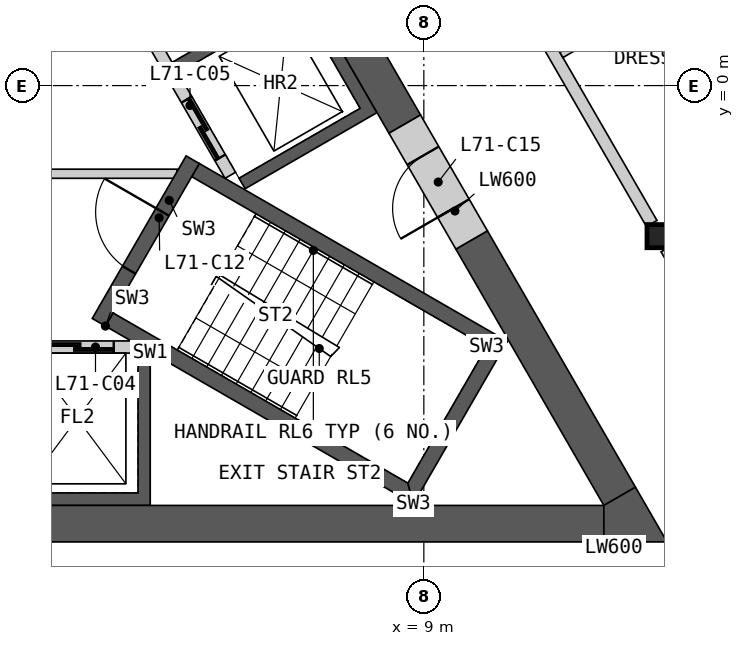
"""IFC4 building model, lengths in metres.
Left out: names, types, materials, properties, quantities, classifications, styles, units other than length and angle.
Written with IfcOpenShell. Run it as: python <this file> out.ifc"""

import sys

from ifc_helpers import new_model, si_unit, direction, frame, frame_2d, origin, origin_2d, place, context, subcontext, project, spatial, polyline, rectangle, i_section, outline, extrude, element, fill, save


model = new_model("IFC4")
c1 = context("Model", 3, precision=1e-05, world=origin(), true_north=direction((0.0, 1.0)))
c2 = subcontext(c1, "Body", "Model", "MODEL_VIEW")
j1 = project(units=[si_unit("LENGTHUNIT", "METRE"), si_unit("PLANEANGLEUNIT", "RADIAN")], contexts=[c1])
p1 = place(None, origin())
s1 = spatial("IfcSite", under=j1, at=p1, CompositionType="ELEMENT")
p2 = place(p1, origin())
s2 = spatial("IfcBuilding", under=s1, at=p2, CompositionType="ELEMENT")
p3 = place(p2, frame((0.0, 0.0, 322.2)))
s3 = spatial("IfcBuildingStorey", under=s2, at=p3, CompositionType="ELEMENT", Elevation=322.2)
p4 = place(p3, frame((12.868, -2.476, 0.0), z_axis=(0.0, 0.0, 1.0), x_axis=(1.0, 0.0, 0.0)))
e1 = element("IfcColumn", 1, at=p4, inside=s3, PredefinedType="COLUMN", context=c2, shape_type="SweptSolid", body=[
    extrude(i_section(OverallWidth=0.396, OverallDepth=0.381, WebThickness=0.019, FlangeThickness=0.03, at=origin_2d()), origin(), (0.0, 0.0, 1.0), 3.4),
])
p5 = place(p3, origin())
e2 = element("IfcWall", 2, at=p5, inside=s3, PredefinedType="SHEAR", context=c2, shape_type="SweptSolid", body=[
    extrude(outline(polyline([(4.5, -4.4), (4.5, -6.906), (-4.5, -6.906), (-4.5, -4.4), (-4.3, -4.4), (-4.3, -6.7), (-2.3, -6.7), (-2.3, -4.4), (-2.1, -4.4), (-2.1, -6.7), (-0.1, -6.7), (-0.1, -4.4), (0.1, -4.4), (0.1, -6.7), (2.1, -6.7), (2.1, -4.4), (2.3, -4.4), (2.3, -6.7), (4.3, -6.7), (4.3, -4.4), (4.5, -4.4)])), origin(), (0.0, 0.0, 1.0), 3.1),
])
p6 = place(p3, frame((-4.187, -4.3, 0.0), z_axis=(0.0, 0.0, 1.0), x_axis=(1.0, 0.0, 0.0)))
e3 = element("IfcWall", 3, at=p6, inside=s3, PredefinedType="SOLIDWALL", context=c2, shape_type="SweptSolid", body=[
    extrude(rectangle(XDim=8.373, YDim=0.2, at=frame_2d((4.187, 0.0))), origin(), (0.0, 0.0, 1.0), 3.1),
])
p7 = place(p6, frame((0.287, 0.0, 0.0)))
e4 = element("IfcOpeningElement", 4, at=p7, cuts=e3, PredefinedType="OPENING", context=c2, shape_type="SweptSolid", body=[
    extrude(rectangle(XDim=1.2, YDim=2.1, at=frame_2d((0.6, 1.05))), frame((0.0, 0.11, 0.0), z_axis=(0.0, -1.0, 0.0), x_axis=(1.0, 0.0, 0.0)), (0.0, 0.0, 1.0), 0.22),
])
p8 = place(p6, frame((2.387, 0.0, 0.0)))
e5 = element("IfcOpeningElement", 5, at=p8, cuts=e3, PredefinedType="OPENING", context=c2, shape_type="SweptSolid", body=[
    extrude(rectangle(XDim=1.4, YDim=2.1, at=frame_2d((0.7, 1.05))), frame((0.0, 0.11, 0.0), z_axis=(0.0, -1.0, 0.0), x_axis=(1.0, 0.0, 0.0)), (0.0, 0.0, 1.0), 0.22),
])
p9 = place(p6, frame((4.737, 0.0, 0.0)))
e6 = element("IfcOpeningElement", 6, at=p9, cuts=e3, PredefinedType="OPENING", context=c2, shape_type="SweptSolid", body=[
    extrude(rectangle(XDim=1.1, YDim=2.1, at=frame_2d((0.55, 1.05))), frame((0.0, 0.11, 0.0), z_axis=(0.0, -1.0, 0.0), x_axis=(1.0, 0.0, 0.0)), (0.0, 0.0, 1.0), 0.22),
])
p10 = place(p6, frame((6.887, 0.0, 0.0)))
e7 = element("IfcOpeningElement", 7, at=p10, cuts=e3, PredefinedType="OPENING", context=c2, shape_type="SweptSolid", body=[
    extrude(rectangle(XDim=1.2, YDim=2.1, at=frame_2d((0.6, 1.05))), frame((0.0, 0.11, 0.0), z_axis=(0.0, -1.0, 0.0), x_axis=(1.0, 0.0, 0.0)), (0.0, 0.0, 1.0), 0.22),
])
p11 = place(p3, origin())
e8 = element("IfcWall", 8, at=p11, inside=s3, PredefinedType="SHEAR", context=c2, shape_type="SweptSolid", body=[
    extrude(outline(polyline([(1.561, 6.097), (3.731, 7.35), (8.231, -0.444), (6.061, -1.697), (5.96, -1.524), (7.952, -0.374), (6.952, 1.358), (4.96, 0.208), (4.861, 0.381), (6.852, 1.531), (5.852, 3.263), (3.861, 2.113), (3.76, 2.287), (5.752, 3.437), (4.752, 5.169), (2.76, 4.019), (2.66, 4.192), (4.652, 5.342), (3.652, 7.074), (1.66, 5.924), (1.561, 6.097)])), origin(), (0.0, 0.0, 1.0), 3.1),
])
p12 = place(p3, frame((5.817, -1.476, 0.0), z_axis=(0.0, 0.0, 1.0), x_axis=(-0.500002616675, 0.866023893041, 0.0)))
e9 = element("IfcWall", 9, at=p12, inside=s3, PredefinedType="SOLIDWALL", context=c2, shape_type="SweptSolid", body=[
    extrude(rectangle(XDim=8.373, YDim=0.2, at=frame_2d((4.187, 0.0))), origin(), (0.0, 0.0, 1.0), 3.1),
])
p13 = place(p12, frame((0.337, 0.0, 0.0)))
e10 = element("IfcOpeningElement", 10, at=p13, cuts=e9, PredefinedType="OPENING", context=c2, shape_type="SweptSolid", body=[
    extrude(rectangle(XDim=1.1, YDim=2.1, at=frame_2d((0.55, 1.05))), frame((0.0, 0.11, 0.0), z_axis=(0.0, -1.0, 0.0), x_axis=(1.0, 0.0, 0.0)), (0.0, 0.0, 1.0), 0.22),
])
p14 = place(p12, frame((2.537, 0.0, 0.0)))
e11 = element("IfcOpeningElement", 11, at=p14, cuts=e9, PredefinedType="OPENING", context=c2, shape_type="SweptSolid", body=[
    extrude(rectangle(XDim=1.1, YDim=2.1, at=frame_2d((0.55, 1.05))), frame((0.0, 0.11, 0.0), z_axis=(0.0, -1.0, 0.0), x_axis=(1.0, 0.0, 0.0)), (0.0, 0.0, 1.0), 0.22),
])
p15 = place(p12, frame((4.737, 0.0, 0.0)))
e12 = element("IfcOpeningElement", 12, at=p15, cuts=e9, PredefinedType="OPENING", context=c2, shape_type="SweptSolid", body=[
    extrude(rectangle(XDim=1.1, YDim=2.1, at=frame_2d((0.55, 1.05))), frame((0.0, 0.11, 0.0), z_axis=(0.0, -1.0, 0.0), x_axis=(1.0, 0.0, 0.0)), (0.0, 0.0, 1.0), 0.22),
])
p16 = place(p12, frame((7.037, 0.0, 0.0)))
e13 = element("IfcOpeningElement", 13, at=p16, cuts=e9, PredefinedType="OPENING", context=c2, shape_type="SweptSolid", body=[
    extrude(rectangle(XDim=0.9, YDim=2.1, at=frame_2d((0.45, 1.05))), frame((0.0, 0.11, 0.0), z_axis=(0.0, -1.0, 0.0), x_axis=(1.0, 0.0, 0.0)), (0.0, 0.0, 1.0), 0.22),
])
p17 = place(p3, frame((-4.941, -1.45, 0.0), z_axis=(0.0, 0.0, 1.0), x_axis=(1.0, 0.0, 0.0)))
e14 = element("IfcWall", 14, at=p17, inside=s3, PredefinedType="PARTITIONING", context=c2, shape_type="SweptSolid", body=[
    extrude(rectangle(XDim=9.882, YDim=0.15, at=frame_2d((4.941, 0.0))), origin(), (0.0, 0.0, 1.0), 3.1),
])
p18 = place(p17, frame((4.391, 0.0, 0.0)))
e15 = element("IfcOpeningElement", 15, at=p18, cuts=e14, PredefinedType="OPENING", context=c2, shape_type="SweptSolid", body=[
    extrude(rectangle(XDim=1.1, YDim=2.1, at=frame_2d((0.55, 1.05))), frame((0.0, 0.085, 0.0), z_axis=(0.0, -1.0, 0.0), x_axis=(1.0, 0.0, 0.0)), (0.0, 0.0, 1.0), 0.17),
])
p19 = place(p3, origin())
e16 = element("IfcWall", 16, at=p19, inside=s3, PredefinedType="SHEAR", context=c2, shape_type="SweptSolid", body=[
    extrude(outline(polyline([(3.763, -3.956), (8.83, -6.881), (8.738, -6.539), (3.888, -3.739), (3.763, -3.956)])), origin(), (0.0, 0.0, 1.0), 3.1),
])
p20 = place(p3, origin())
e17 = element("IfcWall", 17, at=p20, inside=s3, PredefinedType="SHEAR", context=c2, shape_type="SweptSolid", body=[
    extrude(outline(polyline([(8.83, -6.881), (10.374, -4.206), (10.032, -4.298), (8.738, -6.539), (8.83, -6.881)])), origin(), (0.0, 0.0, 1.0), 3.1),
])
p21 = place(p3, origin())
e18 = element("IfcWall", 18, at=p21, inside=s3, PredefinedType="SHEAR", context=c2, shape_type="SweptSolid", body=[
    extrude(outline(polyline([(10.032, -4.298), (10.374, -4.206), (5.307, -1.281), (5.182, -1.498), (10.032, -4.298)])), origin(), (0.0, 0.0, 1.0), 3.1),
])
p22 = place(p3, frame((3.655, -3.893, 0.0), z_axis=(0.0, 0.0, 1.0), x_axis=(0.499982516597, 0.866035497597, 0.0)))
e19 = element("IfcWall", 19, at=p22, inside=s3, PredefinedType="SHEAR", context=c2, shape_type="SweptSolid", body=[
    extrude(rectangle(XDim=3.088, YDim=0.25, at=frame_2d((1.544, 0.0))), origin(), (0.0, 0.0, 1.0), 3.1),
])
p23 = place(p22, frame((0.994, 0.0, 0.0)))
e20 = element("IfcOpeningElement", 20, at=p23, cuts=e19, PredefinedType="OPENING", context=c2, shape_type="SweptSolid", body=[
    extrude(rectangle(XDim=1.1, YDim=2.1, at=frame_2d((0.55, 1.05))), frame((0.0, 0.135, 0.0), z_axis=(0.0, -1.0, 0.0), x_axis=(1.0, 0.0, 0.0)), (0.0, 0.0, 1.0), 0.27),
])
for number, where, z_axis, x_axis in (
    (21, (-4.892, -7.206, 0.0), (0.0, 0.0, 1.0), (1.0, 0.0, 0.0)),
    (22, (8.686, -0.634, 0.0), (0.0, 0.0, 1.0), (-0.5, 0.866, 0.0)),
):
    element("IfcWall", number, at=place(p3, frame(where, z_axis=z_axis, x_axis=x_axis)), inside=s3, PredefinedType="SHEAR", context=c2, shape_type="SweptSolid", body=[
        extrude(rectangle(XDim=16.853, YDim=0.6, at=frame_2d((8.426, 0.0))), origin(), (0.0, 0.0, 1.0), 3.1),
    ])
p24 = place(p3, frame((12.221, -6.756, 0.0), z_axis=(0.0, 0.0, 1.0), x_axis=(-0.50000604952, 0.866021911064, 0.0)))
e23 = element("IfcWall", 23, at=p24, inside=s3, PredefinedType="SHEAR", context=c2, shape_type="SweptSolid", body=[
    extrude(rectangle(XDim=4.869, YDim=0.6, at=frame_2d((2.434, 0.0))), origin(), (0.0, 0.0, 1.0), 3.1),
])
p25 = place(p3, origin())
e24 = element("IfcWall", 24, at=p25, inside=s3, PredefinedType="SHEAR", context=c2, shape_type="SweptSolid", body=[
    extrude(outline(polyline([(11.961, -7.506), (11.961, -6.906), (12.48, -6.606), (13.0, -7.506), (11.961, -7.506)])), origin(), (0.0, 0.0, 1.0), 3.1),
])
p26 = place(p3, frame((9.786, -2.539, 0.0), z_axis=(0.0, 0.0, 1.0), x_axis=(-0.499981787252, 0.866035918664, 0.0)))
e25 = element("IfcWall", 25, at=p26, inside=s3, PredefinedType="SHEAR", context=c2, shape_type="SweptSolid", body=[
    extrude(rectangle(XDim=2.2, YDim=0.6, at=frame_2d((1.1, 0.0))), origin(), (0.0, 0.0, 1.0), 3.1),
])
p27 = place(p26, frame((0.6, 0.0, 0.0)))
e26 = element("IfcOpeningElement", 26, at=p27, cuts=e25, PredefinedType="OPENING", context=c2, shape_type="SweptSolid", body=[
    extrude(rectangle(XDim=1.0, YDim=2.1, at=frame_2d((0.5, 1.05))), frame((0.0, 0.31, 0.0), z_axis=(0.0, -1.0, 0.0), x_axis=(1.0, 0.0, 0.0)), (0.0, 0.0, 1.0), 0.62),
])
p28 = place(p3, frame((8.698, 4.745, 0.0), z_axis=(0.0, 0.0, 1.0), x_axis=(0.499984266882, -0.866034487114, 0.0)))
e27 = element("IfcWall", 27, at=p28, inside=s3, PredefinedType="PARTITIONING", context=c2, shape_type="SweptSolid", body=[
    extrude(rectangle(XDim=8.099, YDim=0.2, at=frame_2d((4.049, 0.0))), origin(), (0.0, 0.0, 1.0), 3.1),
])
p29 = place(p28, frame((1.976, 0.0, 0.0)))
e28 = element("IfcOpeningElement", 28, at=p29, cuts=e27, PredefinedType="OPENING", context=c2, shape_type="SweptSolid", body=[
    extrude(rectangle(XDim=1.0, YDim=2.1, at=frame_2d((0.5, 1.05))), frame((0.0, 0.11, 0.0), z_axis=(0.0, -1.0, 0.0), x_axis=(1.0, 0.0, 0.0)), (0.0, 0.0, 1.0), 0.22),
])
p30 = place(p3, frame((12.988, -2.684, 0.0), z_axis=(0.0, 0.0, 1.0), x_axis=(0.49999094734, -0.866030630277, 0.0)))
e29 = element("IfcWall", 29, at=p30, inside=s3, PredefinedType="PARTITIONING", context=c2, shape_type="SweptSolid", body=[
    extrude(rectangle(XDim=4.513, YDim=0.2, at=frame_2d((2.256, 0.0))), origin(), (0.0, 0.0, 1.0), 3.1),
])
p31 = place(p30, frame((2.459, 0.0, 0.0)))
e30 = element("IfcOpeningElement", 30, at=p31, cuts=e29, PredefinedType="OPENING", context=c2, shape_type="SweptSolid", body=[
    extrude(rectangle(XDim=1.0, YDim=2.1, at=frame_2d((0.5, 1.05))), frame((0.0, 0.11, 0.0), z_axis=(0.0, -1.0, 0.0), x_axis=(1.0, 0.0, 0.0)), (0.0, 0.0, 1.0), 0.22),
])
p32 = place(p3, frame((11.262, 0.504, 0.0), z_axis=(0.0, 0.0, 1.0), x_axis=(0.866020217342, 0.500008983073, 0.0)))
e31 = element("IfcWall", 31, at=p32, inside=s3, PredefinedType="PARTITIONING", context=c2, shape_type="SweptSolid", body=[
    extrude(rectangle(XDim=7.966, YDim=0.1, at=frame_2d((3.983, 0.0))), origin(), (0.0, 0.0, 1.0), 2.33),
])
p33 = place(p32, frame((5.362, 0.0, 0.0)))
e32 = element("IfcOpeningElement", 32, at=p33, cuts=e31, PredefinedType="OPENING", context=c2, shape_type="SweptSolid", body=[
    extrude(rectangle(XDim=0.95, YDim=2.1, at=frame_2d((0.475, 1.05))), frame((0.0, 0.06, 0.0), z_axis=(0.0, -1.0, 0.0), x_axis=(1.0, 0.0, 0.0)), (0.0, 0.0, 1.0), 0.12),
])
p34 = place(p10, origin())
e33 = element("IfcDoor", 33, at=p34, inside=s3, OperationType="SLIDING_TO_LEFT", PredefinedType="DOOR", context=c2, shape_type="SweptSolid", body=[
    extrude(rectangle(XDim=1.2, YDim=2.1, at=frame_2d((0.6, 1.05))), frame((0.0, 0.025, 0.0), z_axis=(0.0, -1.0, 0.0), x_axis=(1.0, 0.0, 0.0)), (0.0, 0.0, 1.0), 0.05),
])
fill(e7, e33)
p35 = place(p13, origin())
e34 = element("IfcDoor", 34, at=p35, inside=s3, OperationType="SLIDING_TO_LEFT", PredefinedType="DOOR", context=c2, shape_type="SweptSolid", body=[
    extrude(rectangle(XDim=1.1, YDim=2.1, at=frame_2d((0.55, 1.05))), frame((0.0, 0.025, 0.0), z_axis=(0.0, -1.0, 0.0), x_axis=(1.0, 0.0, 0.0)), (0.0, 0.0, 1.0), 0.05),
])
fill(e10, e34)
p36 = place(p23, origin())
e35 = element("IfcDoor", 35, at=p36, inside=s3, OperationType="SINGLE_SWING_RIGHT", PredefinedType="DOOR", context=c2, shape_type="SweptSolid", body=[
    extrude(rectangle(XDim=1.1, YDim=2.1, at=frame_2d((0.55, 1.05))), frame((0.0, 0.025, 0.0), z_axis=(0.0, -1.0, 0.0), x_axis=(1.0, 0.0, 0.0)), (0.0, 0.0, 1.0), 0.05),
])
fill(e20, e35)
p37 = place(p27, origin())
e36 = element("IfcDoor", 36, at=p37, inside=s3, OperationType="SINGLE_SWING_LEFT", PredefinedType="DOOR", context=c2, shape_type="SweptSolid", body=[
    extrude(rectangle(XDim=1.0, YDim=2.1, at=frame_2d((0.5, 1.05))), frame((0.0, 0.055, 0.0), z_axis=(0.0, -1.0, 0.0), x_axis=(1.0, 0.0, 0.0)), (0.0, 0.0, 1.0), 0.05),
])
fill(e26, e36)
save(model, sys.argv[1])
